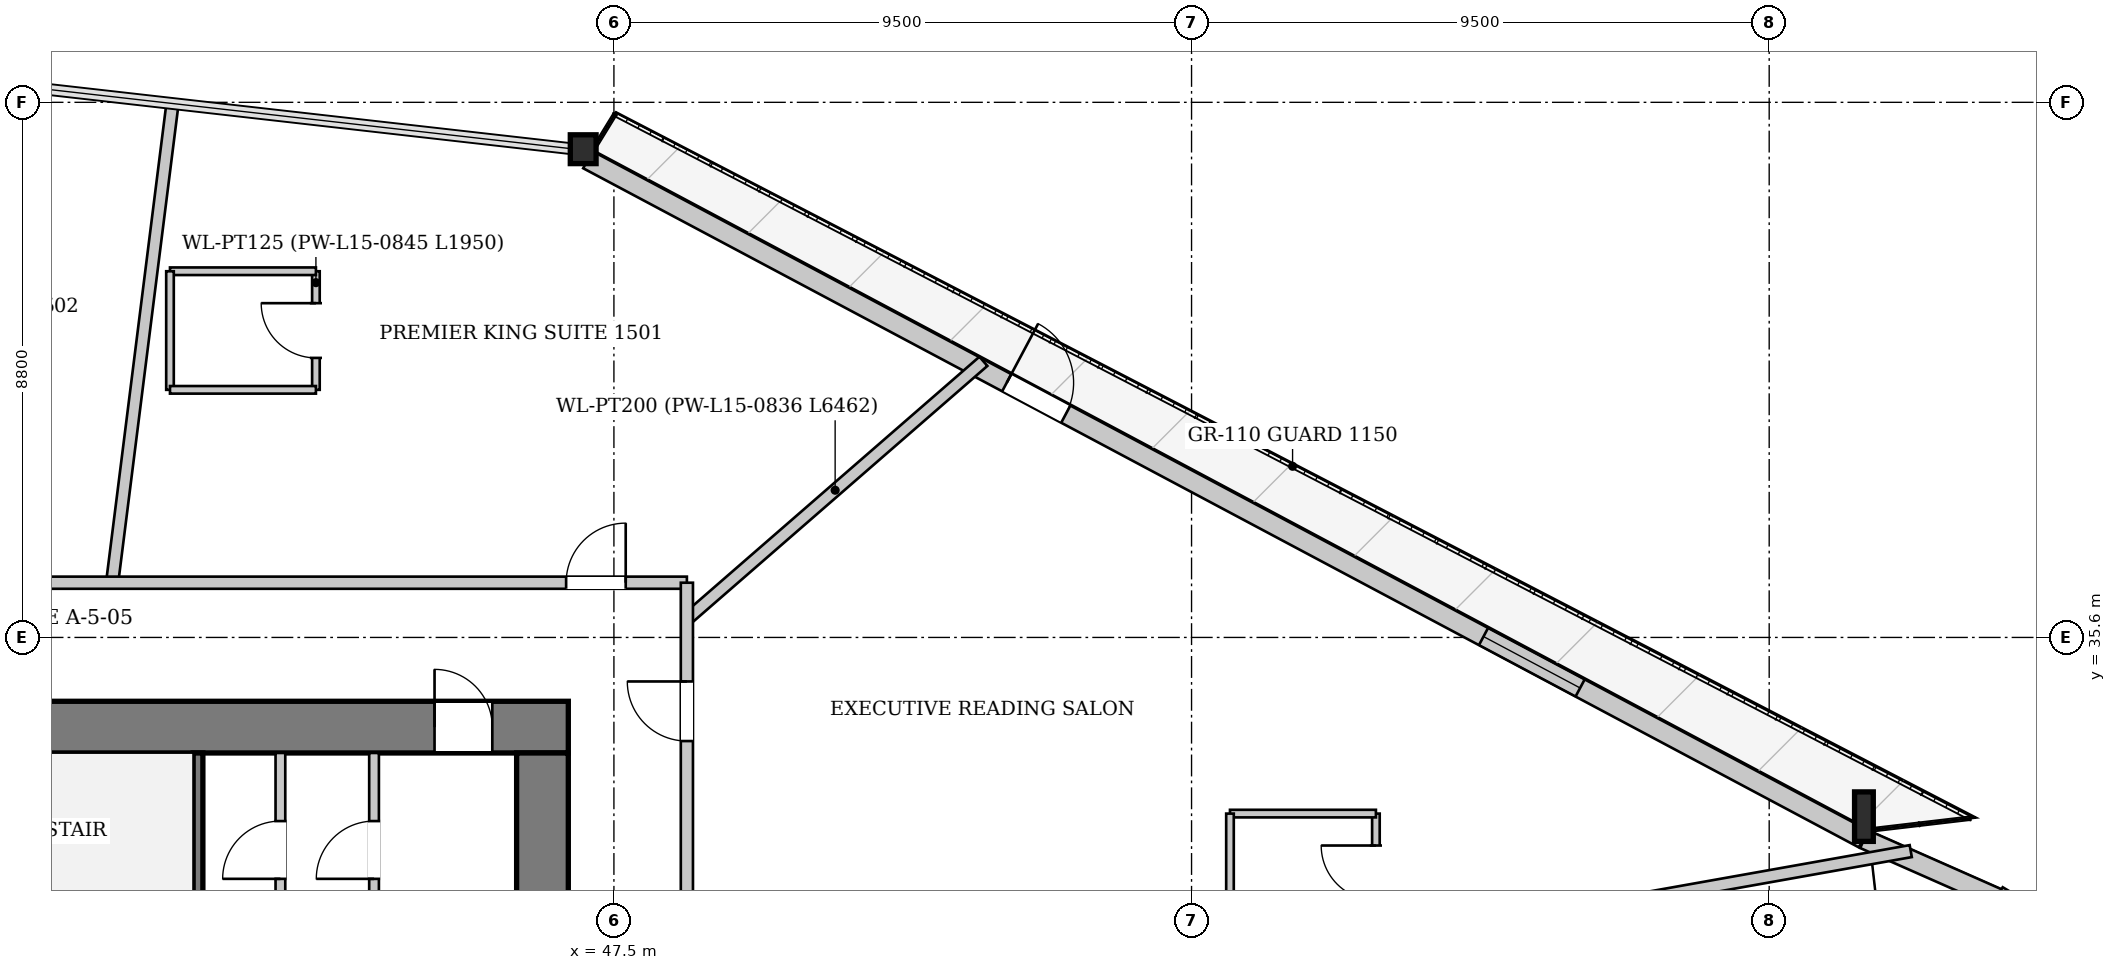
"""IFC4 building model, lengths in metres.
Left out: names, types, materials, properties, quantities, classifications, styles, units other than length and angle.
Written with IfcOpenShell. Run it as: python <this file> out.ifc"""

import sys

from ifc_helpers import new_model, si_unit, direction, frame, frame_2d, origin, origin_2d, place, context, subcontext, project, spatial, rectangle, i_section, extrude, source, transform, mapped, element, fill, save


model = new_model("IFC4")
c1 = context("Model", 3, precision=1e-05, world=origin(), true_north=direction((0.0, 1.0)))
c2 = subcontext(c1, "Body", "Model", "MODEL_VIEW")
j1 = project(units=[si_unit("LENGTHUNIT", "METRE"), si_unit("PLANEANGLEUNIT", "RADIAN")], contexts=[c1])
p1 = place(None, origin())
s1 = spatial("IfcSite", under=j1, at=p1, CompositionType="ELEMENT")
p2 = place(p1, origin())
s2 = spatial("IfcBuilding", under=s1, at=p2, CompositionType="ELEMENT")
p3 = place(p2, frame((0.0, 0.0, 61.25)))
s3 = spatial("IfcBuildingStorey", under=s2, at=p3, CompositionType="ELEMENT", Elevation=61.25)
m1 = source(origin(), c2, "Body", "SweptSolid", [
    extrude(i_section(OverallWidth=0.308, OverallDepth=0.814, WebThickness=0.021, FlangeThickness=0.04, at=origin_2d()), origin(), (0.0, 0.0, 1.0), 3.417),
])
p4 = place(p3, frame((68.126, 32.429, 0.0), z_axis=(-0.04000901182, 0.130958069047, 0.990580265867), x_axis=(-0.95636372102, -0.292178769106, 0.0)))
e1 = element("IfcColumn", 1, at=p4, inside=s3, PredefinedType="COLUMN", context=c2, shape_type="MappedRepresentation", body=[
    mapped(m1, transform((0.0, 0.0, 0.0), x_axis=(1.0, 0.0, 0.0), y_axis=(0.0, 1.0, 0.0), z_axis=(0.0, 0.0, 1.0), scale=1.0)),
])
m2 = source(origin(), c2, "Body", "SweptSolid", [
    extrude(i_section(OverallWidth=0.424, OverallDepth=0.474, WebThickness=0.043, FlangeThickness=0.068, at=origin_2d()), origin(), (0.0, 0.0, 1.0), 3.399),
])
p5 = place(p3, frame((47.145, 43.598, 0.0), z_axis=(-0.088564876449, 0.018100850661, 0.995905930229), x_axis=(-0.200240228048, -0.97974683009, 0.0)))
e2 = element("IfcColumn", 2, at=p5, inside=s3, PredefinedType="COLUMN", context=c2, shape_type="MappedRepresentation", body=[
    mapped(m2, transform((0.0, 0.0, 0.0), x_axis=(1.0, 0.0, 0.0), y_axis=(0.0, 1.0, 0.0), z_axis=(0.0, 0.0, 1.0), scale=1.0)),
])
p6 = place(p3, frame((47.07, 43.457, 0.0), z_axis=(0.0, 0.0, 1.0), x_axis=(0.882722296468, -0.469895038618, 0.0)))
e3 = element("IfcWall", 3, at=p6, inside=s3, PredefinedType="SOLIDWALL", context=c2, shape_type="SweptSolid", body=[
    extrude(rectangle(XDim=23.769, YDim=0.32, at=frame_2d((11.885, 0.0))), origin(), (0.0, 0.0, 1.0), 2.592),
])
p7 = place(p6, frame((7.806, 0.0, 0.0)))
e4 = element("IfcOpeningElement", 4, at=p7, cuts=e3, PredefinedType="OPENING", context=c2, shape_type="SweptSolid", body=[
    extrude(rectangle(XDim=1.1, YDim=2.3, at=frame_2d((0.55, 1.15))), frame((0.0, 0.17, 0.0), z_axis=(0.0, -1.0, 0.0), x_axis=(1.0, 0.0, 0.0)), (0.0, 0.0, 1.0), 0.34),
])
p8 = place(p6, frame((16.689, 0.0, 0.272)))
e5 = element("IfcOpeningElement", 5, at=p8, cuts=e3, PredefinedType="OPENING", context=c2, shape_type="SweptSolid", body=[
    extrude(rectangle(XDim=1.8, YDim=2.2, at=frame_2d((0.9, 1.1))), frame((0.0, 0.17, 0.0), z_axis=(0.0, -1.0, 0.0), x_axis=(1.0, 0.0, 0.0)), (0.0, 0.0, 1.0), 0.34),
])
p9 = place(p3, frame((68.062, 32.283, 0.0), z_axis=(0.0, 0.0, 1.0), x_axis=(0.914627210646, -0.404298238366, 0.0)))
e6 = element("IfcWall", 6, at=p9, inside=s3, PredefinedType="SOLIDWALL", context=c2, shape_type="SweptSolid", body=[
    extrude(rectangle(XDim=2.722, YDim=0.32, at=frame_2d((1.361, 0.0))), origin(), (0.0, 0.0, 1.0), 2.592),
])
p10 = place(p3, frame((70.478, 31.41, 0.0), z_axis=(0.0, 0.0, 1.0), x_axis=(-0.51006357361, -0.86013670476, 0.0)))
e7 = element("IfcWall", 7, at=p10, inside=s3, PredefinedType="SOLIDWALL", context=c2, shape_type="SweptSolid", body=[
    extrude(rectangle(XDim=3.894, YDim=0.32, at=frame_2d((1.947, 0.0))), origin(), (0.0, 0.0, 1.0), 2.592),
])
p11 = place(p10, frame((1.347, 0.0, 0.65)))
e8 = element("IfcOpeningElement", 8, at=p11, cuts=e7, PredefinedType="OPENING", context=c2, shape_type="SweptSolid", body=[
    extrude(rectangle(XDim=1.2, YDim=1.5, at=frame_2d((0.6, 0.75))), frame((0.0, 0.17, 0.0), z_axis=(0.0, -1.0, 0.0), x_axis=(1.0, 0.0, 0.0)), (0.0, 0.0, 1.0), 0.34),
])
p12 = place(p3, frame((29.25, 34.125, 0.0), z_axis=(0.0, 0.0, 1.0), x_axis=(1.0, 0.0, 0.0)))
e9 = element("IfcWall", 9, at=p12, inside=s3, PredefinedType="SHEAR", context=c2, shape_type="SweptSolid", body=[
    extrude(rectangle(XDim=17.5, YDim=0.85, at=frame_2d((8.75, 0.0))), origin(), (0.0, 0.0, 1.0), 3.3),
])
p13 = place(p12, frame((1.85, 0.0, 0.0)))
e10 = element("IfcOpeningElement", 10, at=p13, cuts=e9, PredefinedType="OPENING", context=c2, shape_type="SweptSolid", body=[
    extrude(rectangle(XDim=0.95, YDim=2.1, at=frame_2d((0.475, 1.05))), frame((0.0, 0.435, 0.0), z_axis=(0.0, -1.0, 0.0), x_axis=(1.0, 0.0, 0.0)), (0.0, 0.0, 1.0), 0.87),
])
p14 = place(p12, frame((4.23, 0.0, 0.0)))
e11 = element("IfcOpeningElement", 11, at=p14, cuts=e9, PredefinedType="OPENING", context=c2, shape_type="SweptSolid", body=[
    extrude(rectangle(XDim=1.32, YDim=2.2, at=frame_2d((0.66, 1.1))), frame((0.0, 0.435, 0.0), z_axis=(0.0, -1.0, 0.0), x_axis=(1.0, 0.0, 0.0)), (0.0, 0.0, 1.0), 0.87),
])
p15 = place(p12, frame((15.3, 0.0, 0.0)))
e12 = element("IfcOpeningElement", 12, at=p15, cuts=e9, PredefinedType="OPENING", context=c2, shape_type="SweptSolid", body=[
    extrude(rectangle(XDim=0.95, YDim=2.1, at=frame_2d((0.475, 1.05))), frame((0.0, 0.435, 0.0), z_axis=(0.0, -1.0, 0.0), x_axis=(1.0, 0.0, 0.0)), (0.0, 0.0, 1.0), 0.87),
])
p16 = place(p3, frame((46.325, 33.7, 0.0), z_axis=(0.0, 0.0, 1.0), x_axis=(0.0, -1.0, 0.0)))
e13 = element("IfcWall", 13, at=p16, inside=s3, PredefinedType="SHEAR", context=c2, shape_type="SweptSolid", body=[
    extrude(rectangle(XDim=14.2, YDim=0.85, at=frame_2d((7.1, 0.0))), origin(), (0.0, 0.0, 1.0), 3.3),
])
p17 = place(p16, frame((5.18, 0.0, 0.0)))
e14 = element("IfcOpeningElement", 14, at=p17, cuts=e13, PredefinedType="OPENING", context=c2, shape_type="SweptSolid", body=[
    extrude(rectangle(XDim=1.6, YDim=2.2, at=frame_2d((0.8, 1.1))), frame((0.0, 0.435, 0.0), z_axis=(0.0, -1.0, 0.0), x_axis=(1.0, 0.0, 0.0)), (0.0, 0.0, 1.0), 0.87),
])
p18 = place(p3, frame((40.66, 30.6, 0.0), z_axis=(0.0, 0.0, 1.0), x_axis=(0.0, 1.0, 0.0)))
e15 = element("IfcWall", 15, at=p18, inside=s3, PredefinedType="PARTITIONING", context=c2, shape_type="SweptSolid", body=[
    extrude(rectangle(XDim=3.1, YDim=0.16, at=frame_2d((1.55, 0.0))), origin(), (0.0, 0.0, 1.0), 3.3),
])
p19 = place(p3, frame((42.015, 30.68, 0.0), z_axis=(0.0, 0.0, 1.0), x_axis=(0.0, 1.0, 0.0)))
e16 = element("IfcWall", 16, at=p19, inside=s3, PredefinedType="PARTITIONING", context=c2, shape_type="SweptSolid", body=[
    extrude(rectangle(XDim=3.02, YDim=0.16, at=frame_2d((1.51, 0.0))), origin(), (0.0, 0.0, 1.0), 3.3),
])
p20 = place(p19, frame((0.95, 0.0, 0.0)))
e17 = element("IfcOpeningElement", 17, at=p20, cuts=e16, PredefinedType="OPENING", context=c2, shape_type="SweptSolid", body=[
    extrude(rectangle(XDim=0.95, YDim=2.1, at=frame_2d((0.475, 1.05))), frame((0.0, 0.09, 0.0), z_axis=(0.0, -1.0, 0.0), x_axis=(1.0, 0.0, 0.0)), (0.0, 0.0, 1.0), 0.18),
])
p21 = place(p3, frame((43.555, 30.68, 0.0), z_axis=(0.0, 0.0, 1.0), x_axis=(0.0, 1.0, 0.0)))
e18 = element("IfcWall", 18, at=p21, inside=s3, PredefinedType="PARTITIONING", context=c2, shape_type="SweptSolid", body=[
    extrude(rectangle(XDim=3.02, YDim=0.16, at=frame_2d((1.51, 0.0))), origin(), (0.0, 0.0, 1.0), 3.3),
])
p22 = place(p21, frame((0.95, 0.0, 0.0)))
e19 = element("IfcOpeningElement", 19, at=p22, cuts=e18, PredefinedType="OPENING", context=c2, shape_type="SweptSolid", body=[
    extrude(rectangle(XDim=0.95, YDim=2.1, at=frame_2d((0.475, 1.05))), frame((0.0, 0.09, 0.0), z_axis=(0.0, -1.0, 0.0), x_axis=(1.0, 0.0, 0.0)), (0.0, 0.0, 1.0), 0.18),
])
p23 = place(p3, frame((48.7, 35.901, 0.0), z_axis=(0.0, 0.0, 1.0), x_axis=(0.754728336298, 0.656037451972, 0.0)))
e20 = element("IfcWall", 20, at=p23, inside=s3, PredefinedType="PARTITIONING", context=c2, shape_type="SweptSolid", body=[
    extrude(rectangle(XDim=6.461, YDim=0.2, at=frame_2d((3.231, 0.0))), origin(), (0.0, 0.0, 1.0), 3.3),
])
p24 = place(p3, frame((39.248, 36.5, 0.0), z_axis=(0.0, 0.0, 1.0), x_axis=(0.125018186773, 0.992154450162, 0.0)))
e21 = element("IfcWall", 21, at=p24, inside=s3, PredefinedType="PARTITIONING", context=c2, shape_type="SweptSolid", body=[
    extrude(rectangle(XDim=7.913, YDim=0.2, at=frame_2d((3.957, 0.0))), origin(), (0.0, 0.0, 1.0), 3.3),
])
p25 = place(p3, frame((48.7, 28.504, 0.0), z_axis=(0.0, 0.0, 1.0), x_axis=(0.984531028139, 0.175210315425, 0.0)))
e22 = element("IfcWall", 22, at=p25, inside=s3, PredefinedType="PARTITIONING", context=c2, shape_type="SweptSolid", body=[
    extrude(rectangle(XDim=20.444, YDim=0.2, at=frame_2d((10.222, 0.0))), origin(), (0.0, 0.0, 1.0), 3.3),
])
p26 = place(p3, frame((42.599, 39.672, 0.0), z_axis=(0.0, 0.0, 1.0), x_axis=(0.0, 1.0, 0.0)))
e23 = element("IfcWall", 23, at=p26, inside=s3, PredefinedType="PARTITIONING", context=c2, shape_type="SweptSolid", body=[
    extrude(rectangle(XDim=1.95, YDim=0.125, at=frame_2d((0.975, 0.0))), origin(), (0.0, 0.0, 1.0), 3.3),
])
p27 = place(p26, frame((0.525, 0.0, 0.0)))
e24 = element("IfcOpeningElement", 24, at=p27, cuts=e23, PredefinedType="OPENING", context=c2, shape_type="SweptSolid", body=[
    extrude(rectangle(XDim=0.9, YDim=2.1, at=frame_2d((0.45, 1.05))), frame((0.0, 0.073, 0.0), z_axis=(0.0, -1.0, 0.0), x_axis=(1.0, 0.0, 0.0)), (0.0, 0.0, 1.0), 0.145),
])
p28 = place(p3, frame((42.599, 41.622, 0.0), z_axis=(0.0, 0.0, 1.0), x_axis=(-1.0, 0.0, 0.0)))
e25 = element("IfcWall", 25, at=p28, inside=s3, PredefinedType="PARTITIONING", context=c2, shape_type="SweptSolid", body=[
    extrude(rectangle(XDim=2.4, YDim=0.125, at=frame_2d((1.2, 0.0))), origin(), (0.0, 0.0, 1.0), 3.3),
])
p29 = place(p3, frame((40.199, 41.622, 0.0), z_axis=(0.0, 0.0, 1.0), x_axis=(0.0, -1.0, 0.0)))
e26 = element("IfcWall", 26, at=p29, inside=s3, PredefinedType="PARTITIONING", context=c2, shape_type="SweptSolid", body=[
    extrude(rectangle(XDim=1.95, YDim=0.125, at=frame_2d((0.975, 0.0))), origin(), (0.0, 0.0, 1.0), 3.3),
])
p30 = place(p3, frame((40.199, 39.672, 0.0), z_axis=(0.0, 0.0, 1.0), x_axis=(1.0, 0.0, 0.0)))
e27 = element("IfcWall", 27, at=p30, inside=s3, PredefinedType="PARTITIONING", context=c2, shape_type="SweptSolid", body=[
    extrude(rectangle(XDim=2.4, YDim=0.125, at=frame_2d((1.2, 0.0))), origin(), (0.0, 0.0, 1.0), 3.3),
])
p31 = place(p3, frame((60.032, 30.753, 0.0), z_axis=(0.0, 0.0, 1.0), x_axis=(0.0, 1.0, 0.0)))
e28 = element("IfcWall", 28, at=p31, inside=s3, PredefinedType="PARTITIONING", context=c2, shape_type="SweptSolid", body=[
    extrude(rectangle(XDim=1.95, YDim=0.125, at=frame_2d((0.975, 0.0))), origin(), (0.0, 0.0, 1.0), 3.3),
])
p32 = place(p31, frame((0.525, 0.0, 0.0)))
e29 = element("IfcOpeningElement", 29, at=p32, cuts=e28, PredefinedType="OPENING", context=c2, shape_type="SweptSolid", body=[
    extrude(rectangle(XDim=0.9, YDim=2.1, at=frame_2d((0.45, 1.05))), frame((0.0, 0.073, 0.0), z_axis=(0.0, -1.0, 0.0), x_axis=(1.0, 0.0, 0.0)), (0.0, 0.0, 1.0), 0.145),
])
p33 = place(p3, frame((60.032, 32.703, 0.0), z_axis=(0.0, 0.0, 1.0), x_axis=(-1.0, 0.0, 0.0)))
e30 = element("IfcWall", 30, at=p33, inside=s3, PredefinedType="PARTITIONING", context=c2, shape_type="SweptSolid", body=[
    extrude(rectangle(XDim=2.4, YDim=0.125, at=frame_2d((1.2, 0.0))), origin(), (0.0, 0.0, 1.0), 3.3),
])
p34 = place(p3, frame((57.632, 32.703, 0.0), z_axis=(0.0, 0.0, 1.0), x_axis=(0.0, -1.0, 0.0)))
e31 = element("IfcWall", 31, at=p34, inside=s3, PredefinedType="PARTITIONING", context=c2, shape_type="SweptSolid", body=[
    extrude(rectangle(XDim=1.95, YDim=0.125, at=frame_2d((0.975, 0.0))), origin(), (0.0, 0.0, 1.0), 3.3),
])
p35 = place(p3, frame((27.3, 36.5, 0.0), z_axis=(0.0, 0.0, 1.0), x_axis=(1.0, 0.0, 0.0)))
e32 = element("IfcWall", 32, at=p35, inside=s3, PredefinedType="PARTITIONING", context=c2, shape_type="SweptSolid", body=[
    extrude(rectangle(XDim=21.4, YDim=0.2, at=frame_2d((10.7, 0.0))), origin(), (0.0, 0.0, 1.0), 3.3),
])
p36 = place(p35, frame((19.414, 0.0, 0.0)))
e33 = element("IfcOpeningElement", 33, at=p36, cuts=e32, PredefinedType="OPENING", context=c2, shape_type="SweptSolid", body=[
    extrude(rectangle(XDim=0.98, YDim=2.15, at=frame_2d((0.49, 1.075))), frame((0.0, 0.11, 0.0), z_axis=(0.0, -1.0, 0.0), x_axis=(1.0, 0.0, 0.0)), (0.0, 0.0, 1.0), 0.22),
])
p37 = place(p35, frame((6.682, 0.0, 0.0)))
e34 = element("IfcOpeningElement", 34, at=p37, cuts=e32, PredefinedType="OPENING", context=c2, shape_type="SweptSolid", body=[
    extrude(rectangle(XDim=0.98, YDim=2.15, at=frame_2d((0.49, 1.075))), frame((0.0, 0.11, 0.0), z_axis=(0.0, -1.0, 0.0), x_axis=(1.0, 0.0, 0.0)), (0.0, 0.0, 1.0), 0.22),
])
p38 = place(p3, frame((48.7, 16.7, 0.0), z_axis=(0.0, 0.0, 1.0), x_axis=(0.0, 1.0, 0.0)))
e35 = element("IfcWall", 35, at=p38, inside=s3, PredefinedType="PARTITIONING", context=c2, shape_type="SweptSolid", body=[
    extrude(rectangle(XDim=19.8, YDim=0.2, at=frame_2d((9.9, 0.0))), origin(), (0.0, 0.0, 1.0), 3.3),
])
p39 = place(p38, frame((6.378, 0.0, 0.0)))
e36 = element("IfcOpeningElement", 36, at=p39, cuts=e35, PredefinedType="OPENING", context=c2, shape_type="SweptSolid", body=[
    extrude(rectangle(XDim=0.98, YDim=2.15, at=frame_2d((0.49, 1.075))), frame((0.0, 0.11, 0.0), z_axis=(0.0, -1.0, 0.0), x_axis=(1.0, 0.0, 0.0)), (0.0, 0.0, 1.0), 0.22),
])
p40 = place(p38, frame((17.196, 0.0, 0.0)))
e37 = element("IfcOpeningElement", 37, at=p40, cuts=e35, PredefinedType="OPENING", context=c2, shape_type="SweptSolid", body=[
    extrude(rectangle(XDim=0.98, YDim=2.15, at=frame_2d((0.49, 1.075))), frame((0.0, 0.11, 0.0), z_axis=(0.0, -1.0, 0.0), x_axis=(1.0, 0.0, 0.0)), (0.0, 0.0, 1.0), 0.22),
])
m3 = source(origin(), c2, "Body", "SweptSolid", [
    extrude(rectangle(XDim=1.1, YDim=2.3, at=frame_2d((0.55, 1.15))), frame((0.0, 0.025, 0.0), z_axis=(0.0, -1.0, 0.0), x_axis=(1.0, 0.0, 0.0)), (0.0, 0.0, 1.0), 0.05),
])
p41 = place(p7, origin())
e38 = element("IfcDoor", 38, at=p41, inside=s3, OperationType="SINGLE_SWING_LEFT", PredefinedType="DOOR", context=c2, shape_type="MappedRepresentation", body=[
    mapped(m3, transform((0.0, 0.0, 0.0), x_axis=(1.0, 0.0, 0.0), y_axis=(0.0, 1.0, 0.0), z_axis=(0.0, 0.0, 1.0), scale=1.0)),
])
fill(e4, e38)
m4 = source(origin(), c2, "Body", "SweptSolid", [
    extrude(rectangle(XDim=1.8, YDim=2.2, at=frame_2d((0.9, 1.1))), frame((0.0, 0.03, 0.0), z_axis=(0.0, -1.0, 0.0), x_axis=(1.0, 0.0, 0.0)), (0.0, 0.0, 1.0), 0.06),
])
p42 = place(p8, origin())
e39 = element("IfcWindow", 39, at=p42, inside=s3, PartitioningType="SINGLE_PANEL", PredefinedType="WINDOW", context=c2, shape_type="MappedRepresentation", body=[
    mapped(m4, transform((0.0, 0.0, 0.0), x_axis=(1.0, 0.0, 0.0), y_axis=(0.0, 1.0, 0.0), z_axis=(0.0, 0.0, 1.0), scale=1.0)),
])
fill(e5, e39)
m5 = source(origin(), c2, "Body", "SweptSolid", [
    extrude(rectangle(XDim=0.95, YDim=2.1, at=frame_2d((0.475, 1.05))), frame((0.0, 0.025, 0.0), z_axis=(0.0, -1.0, 0.0), x_axis=(1.0, 0.0, 0.0)), (0.0, 0.0, 1.0), 0.05),
])
p43 = place(p20, origin())
e40 = element("IfcDoor", 40, at=p43, inside=s3, OperationType="SINGLE_SWING_LEFT", PredefinedType="DOOR", context=c2, shape_type="MappedRepresentation", body=[
    mapped(m5, transform((0.0, 0.0, 0.0), x_axis=(1.0, 0.0, 0.0), y_axis=(0.0, 1.0, 0.0), z_axis=(0.0, 0.0, 1.0), scale=1.0)),
])
fill(e17, e40)
p44 = place(p22, origin())
e41 = element("IfcDoor", 41, at=p44, inside=s3, OperationType="SINGLE_SWING_LEFT", PredefinedType="DOOR", context=c2, shape_type="MappedRepresentation", body=[
    mapped(m5, transform((0.0, 0.0, 0.0), x_axis=(1.0, 0.0, 0.0), y_axis=(0.0, 1.0, 0.0), z_axis=(0.0, 0.0, 1.0), scale=1.0)),
])
fill(e19, e41)
p45 = place(p15, origin())
e42 = element("IfcDoor", 42, at=p45, inside=s3, OperationType="SINGLE_SWING_LEFT", PredefinedType="DOOR", context=c2, shape_type="MappedRepresentation", body=[
    mapped(m5, transform((0.0, 0.0, 0.0), x_axis=(1.0, 0.0, 0.0), y_axis=(0.0, 1.0, 0.0), z_axis=(0.0, 0.0, 1.0), scale=1.0)),
])
fill(e12, e42)
m6 = source(origin(), c2, "Body", "SweptSolid", [
    extrude(rectangle(XDim=0.9, YDim=2.1, at=frame_2d((0.45, 1.05))), frame((0.0, 0.025, 0.0), z_axis=(0.0, -1.0, 0.0), x_axis=(1.0, 0.0, 0.0)), (0.0, 0.0, 1.0), 0.05),
])
p46 = place(p27, origin())
e43 = element("IfcDoor", 43, at=p46, inside=s3, OperationType="SINGLE_SWING_RIGHT", PredefinedType="DOOR", context=c2, shape_type="MappedRepresentation", body=[
    mapped(m6, transform((0.0, 0.0, 0.0), x_axis=(1.0, 0.0, 0.0), y_axis=(0.0, 1.0, 0.0), z_axis=(0.0, 0.0, 1.0), scale=1.0)),
])
fill(e24, e43)
p47 = place(p32, origin())
e44 = element("IfcDoor", 44, at=p47, inside=s3, OperationType="SINGLE_SWING_RIGHT", PredefinedType="DOOR", context=c2, shape_type="MappedRepresentation", body=[
    mapped(m6, transform((0.0, 0.0, 0.0), x_axis=(1.0, 0.0, 0.0), y_axis=(0.0, 1.0, 0.0), z_axis=(0.0, 0.0, 1.0), scale=1.0)),
])
fill(e29, e44)
m7 = source(origin(), c2, "Body", "SweptSolid", [
    extrude(rectangle(XDim=0.98, YDim=2.15, at=frame_2d((0.49, 1.075))), frame((0.0, 0.025, 0.0), z_axis=(0.0, -1.0, 0.0), x_axis=(1.0, 0.0, 0.0)), (0.0, 0.0, 1.0), 0.05),
])
p48 = place(p36, origin())
e45 = element("IfcDoor", 45, at=p48, inside=s3, OperationType="SINGLE_SWING_RIGHT", PredefinedType="DOOR", context=c2, shape_type="MappedRepresentation", body=[
    mapped(m7, transform((0.0, 0.0, 0.0), x_axis=(1.0, 0.0, 0.0), y_axis=(0.0, 1.0, 0.0), z_axis=(0.0, 0.0, 1.0), scale=1.0)),
])
fill(e33, e45)
p49 = place(p40, origin())
e46 = element("IfcDoor", 46, at=p49, inside=s3, OperationType="SINGLE_SWING_RIGHT", PredefinedType="DOOR", context=c2, shape_type="MappedRepresentation", body=[
    mapped(m7, transform((0.0, 0.0, 0.0), x_axis=(1.0, 0.0, 0.0), y_axis=(0.0, 1.0, 0.0), z_axis=(0.0, 0.0, 1.0), scale=1.0)),
])
fill(e37, e46)
save(model, sys.argv[1])
